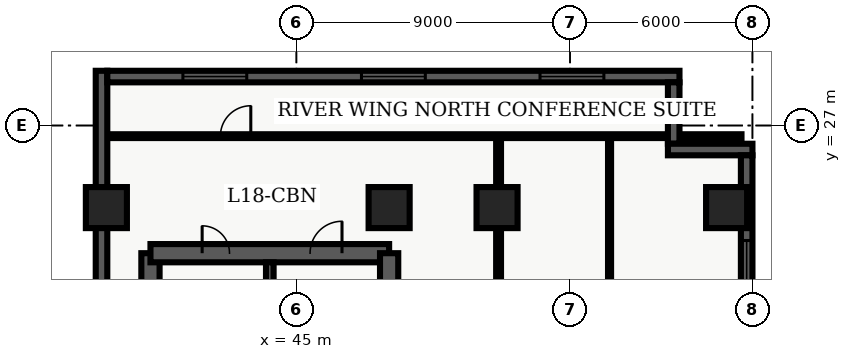
"""IFC4 building model, lengths in metres.
Left out: names, types, materials, properties, quantities, classifications, styles, units other than length and angle.
Written with IfcOpenShell. Run it as: python <this file> out.ifc"""

import sys

from ifc_helpers import new_model, entity, si_unit, converted_unit, direction, frame, origin_with_axes, origin_2d_with_axis, place, context, subcontext, project, spatial, polyline, rectangle, outline, extrude, element, fill, save


model = new_model("IFC4")
c1 = context("Model", 3, precision=1e-05, world=origin_with_axes(), true_north=direction((0.0, 1.0)))
c2 = subcontext(c1, "Body", "Model", "MODEL_VIEW")
j1 = project(units=[si_unit("LENGTHUNIT", "METRE"), converted_unit("PLANEANGLEUNIT", "DEGREE", entity("IfcPlaneAngleMeasure", 0.017), si_unit("PLANEANGLEUNIT", "RADIAN"), dimensions=[0, 0, 0, 0, 0, 0, 0])], contexts=[c1])
p1 = place(None, origin_with_axes())
s1 = spatial("IfcSite", under=j1, at=p1, CompositionType="ELEMENT")
p2 = place(p1, origin_with_axes())
s2 = spatial("IfcBuilding", under=s1, at=p2, CompositionType="ELEMENT")
p3 = place(p2, frame((0.0, 0.0, 75.6), z_axis=(0.0, 0.0, 1.0), x_axis=(1.0, 0.0, 0.0)))
s3 = spatial("IfcBuildingStorey", under=s2, at=p3, CompositionType="ELEMENT", Elevation=75.6)
p4 = place(p3, frame((40.2, 7.2, 0.0), z_axis=(0.0, 0.0, 1.0), x_axis=(0.0, 1.0, 0.0)))
e1 = element("IfcWall", 1, at=p4, inside=s3, PredefinedType="SHEAR", context=c2, shape_type="SweptSolid", body=[
    extrude(outline(polyline([(0.0, -0.3), (15.6, -0.3), (15.6, 0.3), (0.0, 0.3), (0.0, -0.3)])), origin_with_axes(), (0.0, 0.0, 1.0), 3.6),
])
p5 = place(p4, frame((12.75, 0.0, 0.0), z_axis=(0.0, 0.0, 1.0), x_axis=(1.0, 0.0, 0.0)))
e2 = element("IfcOpeningElement", 2, at=p5, cuts=e1, PredefinedType="OPENING", context=c2, shape_type="SweptSolid", body=[
    extrude(rectangle(XDim=1.2, YDim=0.62, at=origin_2d_with_axis()), origin_with_axes(), (0.0, 0.0, 1.0), 2.15),
])
p6 = place(p4, frame((9.3, 0.0, 0.0), z_axis=(0.0, 0.0, 1.0), x_axis=(1.0, 0.0, 0.0)))
e3 = element("IfcOpeningElement", 3, at=p6, cuts=e1, PredefinedType="OPENING", context=c2, shape_type="SweptSolid", body=[
    extrude(rectangle(XDim=0.9, YDim=0.62, at=origin_2d_with_axis()), origin_with_axes(), (0.0, 0.0, 1.0), 2.15),
])
p7 = place(p3, frame((40.2, 22.8, 0.0), z_axis=(0.0, 0.0, 1.0), x_axis=(1.0, 0.0, 0.0)))
e4 = element("IfcWall", 4, at=p7, inside=s3, PredefinedType="SHEAR", context=c2, shape_type="SweptSolid", body=[
    extrude(outline(polyline([(0.0, -0.3), (7.85, -0.3), (7.85, 0.3), (0.0, 0.3), (0.0, -0.3)])), origin_with_axes(), (0.0, 0.0, 1.0), 3.6),
])
p8 = place(p7, frame((5.775, 0.0, 0.0), z_axis=(0.0, 0.0, 1.0), x_axis=(1.0, 0.0, 0.0)))
e5 = element("IfcOpeningElement", 5, at=p8, cuts=e4, PredefinedType="OPENING", context=c2, shape_type="SweptSolid", body=[
    extrude(rectangle(XDim=1.05, YDim=0.62, at=origin_2d_with_axis()), origin_with_axes(), (0.0, 0.0, 1.0), 2.15),
])
p9 = place(p7, frame((2.15, 0.0, 0.0), z_axis=(0.0, 0.0, 1.0), x_axis=(1.0, 0.0, 0.0)))
e6 = element("IfcOpeningElement", 6, at=p9, cuts=e4, PredefinedType="OPENING", context=c2, shape_type="SweptSolid", body=[
    extrude(rectangle(XDim=0.9, YDim=0.62, at=origin_2d_with_axis()), origin_with_axes(), (0.0, 0.0, 1.0), 2.15),
])
p10 = place(p3, frame((48.05, 7.2, 0.0), z_axis=(0.0, 0.0, 1.0), x_axis=(0.0, 1.0, 0.0)))
e7 = element("IfcWall", 7, at=p10, inside=s3, PredefinedType="SHEAR", context=c2, shape_type="SweptSolid", body=[
    extrude(outline(polyline([(0.0, -0.3), (15.6, -0.3), (15.6, 0.3), (0.0, 0.3), (0.0, -0.3)])), origin_with_axes(), (0.0, 0.0, 1.0), 3.6),
])
p11 = place(p10, frame((1.425, 0.0, 0.0), z_axis=(0.0, 0.0, 1.0), x_axis=(1.0, 0.0, 0.0)))
e8 = element("IfcOpeningElement", 8, at=p11, cuts=e7, PredefinedType="OPENING", context=c2, shape_type="SweptSolid", body=[
    extrude(rectangle(XDim=1.05, YDim=0.62, at=origin_2d_with_axis()), origin_with_axes(), (0.0, 0.0, 1.0), 2.15),
])
p12 = place(p10, frame((3.475, 0.0, 0.0), z_axis=(0.0, 0.0, 1.0), x_axis=(1.0, 0.0, 0.0)))
e9 = element("IfcOpeningElement", 9, at=p12, cuts=e7, PredefinedType="OPENING", context=c2, shape_type="SweptSolid", body=[
    extrude(rectangle(XDim=1.05, YDim=0.62, at=origin_2d_with_axis()), origin_with_axes(), (0.0, 0.0, 1.0), 2.15),
])
p13 = place(p10, frame((5.625, 0.0, 0.0), z_axis=(0.0, 0.0, 1.0), x_axis=(1.0, 0.0, 0.0)))
e10 = element("IfcOpeningElement", 10, at=p13, cuts=e7, PredefinedType="OPENING", context=c2, shape_type="SweptSolid", body=[
    extrude(rectangle(XDim=0.95, YDim=0.62, at=origin_2d_with_axis()), origin_with_axes(), (0.0, 0.0, 1.0), 2.15),
])
p14 = place(p3, frame((44.125, 7.5, 0.0), z_axis=(0.0, 0.0, 1.0), x_axis=(0.0, 1.0, 0.0)))
e11 = element("IfcWall", 11, at=p14, inside=s3, PredefinedType="SHEAR", context=c2, shape_type="SweptSolid", body=[
    extrude(outline(polyline([(0.0, -0.125), (15.0, -0.125), (15.0, 0.125), (0.0, 0.125), (0.0, -0.125)])), origin_with_axes(), (0.0, 0.0, 1.0), 3.6),
])
for number, where, z_axis, x_axis in (
    (12, (38.75, 24.3, 0.0), (0.0, 0.0, 1.0), (1.0, 0.0, 0.0)),
    (13, (48.05, 24.3, 0.0), (0.0, 0.0, 1.0), (1.0, 0.0, 0.0)),
    (14, (51.6, 24.3, 0.0), (0.0, 0.0, 1.0), (1.0, 0.0, 0.0)),
    (15, (59.15, 24.3, 0.0), (0.0, 0.0, 1.0), (1.0, 0.0, 0.0)),
):
    element("IfcColumn", number, at=place(p3, frame(where, z_axis=z_axis, x_axis=x_axis)), inside=s3, PredefinedType="COLUMN", context=c2, shape_type="SweptSolid", body=[
        extrude(rectangle(XDim=1.35, YDim=1.35, at=origin_2d_with_axis()), origin_with_axes(), (0.0, 0.0, 1.0), 3.9),
    ])
p15 = place(p3, frame((51.65, 7.85, 0.0), z_axis=(0.0, 0.0, 1.0), x_axis=(0.0, 1.0, 0.0)))
e16 = element("IfcWall", 16, at=p15, inside=s3, PredefinedType="PARTITIONING", context=c2, shape_type="SweptSolid", body=[
    extrude(outline(polyline([(0.0, -0.08), (18.8, -0.08), (18.8, 0.08), (0.0, 0.08), (0.0, -0.08)])), origin_with_axes(), (0.0, 0.0, 1.0), 2.64),
])
p16 = place(p15, frame((4.443, 0.0, 0.0), z_axis=(0.0, 0.0, 1.0), x_axis=(1.0, 0.0, 0.0)))
e17 = element("IfcOpeningElement", 17, at=p16, cuts=e16, PredefinedType="OPENING", context=c2, shape_type="SweptSolid", body=[
    extrude(rectangle(XDim=1.0, YDim=0.18, at=origin_2d_with_axis()), origin_with_axes(), (0.0, 0.0, 1.0), 2.15),
])
p17 = place(p15, frame((13.503, 0.0, 0.0), z_axis=(0.0, 0.0, 1.0), x_axis=(1.0, 0.0, 0.0)))
e18 = element("IfcOpeningElement", 18, at=p17, cuts=e16, PredefinedType="OPENING", context=c2, shape_type="SweptSolid", body=[
    extrude(rectangle(XDim=1.0, YDim=0.18, at=origin_2d_with_axis()), origin_with_axes(), (0.0, 0.0, 1.0), 2.15),
])
p18 = place(p3, frame((38.76, 26.65, 0.0), z_axis=(0.0, 0.0, 1.0), x_axis=(1.0, 0.0, 0.0)))
e19 = element("IfcWall", 19, at=p18, inside=s3, PredefinedType="PARTITIONING", context=c2, shape_type="SweptSolid", body=[
    extrude(outline(polyline([(0.0, -0.062), (20.88, -0.062), (20.88, 0.062), (0.0, 0.062), (0.0, -0.062)])), origin_with_axes(), (0.0, 0.0, 1.0), 2.64),
])
p19 = place(p18, frame((4.24, 0.0, 0.0), z_axis=(0.0, 0.0, 1.0), x_axis=(1.0, 0.0, 0.0)))
e20 = element("IfcOpeningElement", 20, at=p19, cuts=e19, PredefinedType="OPENING", context=c2, shape_type="SweptSolid", body=[
    extrude(rectangle(XDim=1.0, YDim=0.145, at=origin_2d_with_axis()), origin_with_axes(), (0.0, 0.0, 1.0), 2.15),
])
p20 = place(p3, frame((55.3, 7.98, 0.0), z_axis=(0.0, 0.0, 1.0), x_axis=(0.0, 1.0, 0.0)))
e21 = element("IfcWall", 21, at=p20, inside=s3, PredefinedType="PARTITIONING", context=c2, shape_type="SweptSolid", body=[
    extrude(outline(polyline([(0.0, -0.05), (18.54, -0.05), (18.54, 0.05), (0.0, 0.05), (0.0, -0.05)])), origin_with_axes(), (0.0, 0.0, 1.0), 2.64),
])
p21 = place(p20, frame((4.033, 0.0, 0.0), z_axis=(0.0, 0.0, 1.0), x_axis=(1.0, 0.0, 0.0)))
e22 = element("IfcOpeningElement", 22, at=p21, cuts=e21, PredefinedType="OPENING", context=c2, shape_type="SweptSolid", body=[
    extrude(rectangle(XDim=0.95, YDim=0.12, at=origin_2d_with_axis()), origin_with_axes(), (0.0, 0.0, 1.0), 2.15),
])
p22 = place(p20, frame((13.373, 0.0, 0.0), z_axis=(0.0, 0.0, 1.0), x_axis=(1.0, 0.0, 0.0)))
e23 = element("IfcOpeningElement", 23, at=p22, cuts=e21, PredefinedType="OPENING", context=c2, shape_type="SweptSolid", body=[
    extrude(rectangle(XDim=0.95, YDim=0.12, at=origin_2d_with_axis()), origin_with_axes(), (0.0, 0.0, 1.0), 2.15),
])
p23 = place(p3, frame((38.59, 21.22, 0.0), z_axis=(0.0, 0.0, 1.0), x_axis=(0.0, 1.0, 0.0)))
e24 = element("IfcWall", 24, at=p23, inside=s3, PredefinedType="SOLIDWALL", context=c2, shape_type="SweptSolid", body=[
    extrude(outline(polyline([(0.0, -0.19), (7.58, -0.19), (7.58, 0.19), (0.0, 0.19), (0.0, -0.19)])), origin_with_axes(), (0.0, 0.0, 1.0), 3.6),
])
p24 = place(p3, frame((38.78, 28.61, 0.0), z_axis=(0.0, 0.0, 1.0), x_axis=(1.0, 0.0, 0.0)))
e25 = element("IfcWall", 25, at=p24, inside=s3, PredefinedType="SOLIDWALL", context=c2, shape_type="SweptSolid", body=[
    extrude(outline(polyline([(0.0, -0.19), (18.82, -0.19), (18.82, 0.19), (0.0, 0.19), (0.0, -0.19)])), origin_with_axes(), (0.0, 0.0, 1.0), 3.6),
])
p25 = place(p24, frame((3.537, 0.0, 0.45), z_axis=(0.0, 0.0, 1.0), x_axis=(1.0, 0.0, 0.0)))
e26 = element("IfcOpeningElement", 26, at=p25, cuts=e25, PredefinedType="OPENING", context=c2, shape_type="SweptSolid", body=[
    extrude(rectangle(XDim=2.1, YDim=0.4, at=origin_2d_with_axis()), origin_with_axes(), (0.0, 0.0, 1.0), 2.2),
])
p26 = place(p24, frame((9.41, 0.0, 0.45), z_axis=(0.0, 0.0, 1.0), x_axis=(1.0, 0.0, 0.0)))
e27 = element("IfcOpeningElement", 27, at=p26, cuts=e25, PredefinedType="OPENING", context=c2, shape_type="SweptSolid", body=[
    extrude(rectangle(XDim=2.1, YDim=0.4, at=origin_2d_with_axis()), origin_with_axes(), (0.0, 0.0, 1.0), 2.2),
])
p27 = place(p24, frame((15.283, 0.0, 0.45), z_axis=(0.0, 0.0, 1.0), x_axis=(1.0, 0.0, 0.0)))
e28 = element("IfcOpeningElement", 28, at=p27, cuts=e25, PredefinedType="OPENING", context=c2, shape_type="SweptSolid", body=[
    extrude(rectangle(XDim=2.1, YDim=0.4, at=origin_2d_with_axis()), origin_with_axes(), (0.0, 0.0, 1.0), 2.2),
])
p28 = place(p3, frame((57.41, 28.42, 0.0), z_axis=(0.0, 0.0, 1.0), x_axis=(0.0, -1.0, 0.0)))
e29 = element("IfcWall", 29, at=p28, inside=s3, PredefinedType="SOLIDWALL", context=c2, shape_type="SweptSolid", body=[
    extrude(outline(polyline([(0.0, -0.19), (2.02, -0.19), (2.02, 0.19), (0.0, 0.19), (0.0, -0.19)])), origin_with_axes(), (0.0, 0.0, 1.0), 3.6),
])
p29 = place(p3, frame((57.22, 26.21, 0.0), z_axis=(0.0, 0.0, 1.0), x_axis=(1.0, 0.0, 0.0)))
e30 = element("IfcWall", 30, at=p29, inside=s3, PredefinedType="SOLIDWALL", context=c2, shape_type="SweptSolid", body=[
    extrude(outline(polyline([(0.0, -0.19), (2.78, -0.19), (2.78, 0.19), (0.0, 0.19), (0.0, -0.19)])), origin_with_axes(), (0.0, 0.0, 1.0), 3.6),
])
p30 = place(p3, frame((59.81, 26.02, 0.0), z_axis=(0.0, 0.0, 1.0), x_axis=(0.0, -1.0, 0.0)))
e31 = element("IfcWall", 31, at=p30, inside=s3, PredefinedType="SOLIDWALL", context=c2, shape_type="SweptSolid", body=[
    extrude(outline(polyline([(0.0, -0.19), (23.62, -0.19), (23.62, 0.19), (0.0, 0.19), (0.0, -0.19)])), origin_with_axes(), (0.0, 0.0, 1.0), 3.6),
])
p31 = place(p30, frame((3.853, 0.0, 0.45), z_axis=(0.0, 0.0, 1.0), x_axis=(1.0, 0.0, 0.0)))
e32 = element("IfcOpeningElement", 32, at=p31, cuts=e31, PredefinedType="OPENING", context=c2, shape_type="SweptSolid", body=[
    extrude(rectangle(XDim=2.1, YDim=0.4, at=origin_2d_with_axis()), origin_with_axes(), (0.0, 0.0, 1.0), 2.2),
])
p32 = place(p30, frame((20.218, 0.0, 0.45), z_axis=(0.0, 0.0, 1.0), x_axis=(1.0, 0.0, 0.0)))
e33 = element("IfcOpeningElement", 33, at=p32, cuts=e31, PredefinedType="OPENING", context=c2, shape_type="SweptSolid", body=[
    extrude(rectangle(XDim=2.1, YDim=0.4, at=origin_2d_with_axis()), origin_with_axes(), (0.0, 0.0, 1.0), 2.2),
])
p33 = place(p7, frame((5.775, 0.0, 0.0), z_axis=(0.0, 0.0, 1.0), x_axis=(1.0, 0.0, 0.0)))
e34 = element("IfcDoor", 34, at=p33, inside=s3, OperationType="SINGLE_SWING_RIGHT", PredefinedType="DOOR", context=c2, shape_type="SweptSolid", body=[
    extrude(rectangle(XDim=1.05, YDim=0.09, at=origin_2d_with_axis()), origin_with_axes(), (0.0, 0.0, 1.0), 2.15),
])
fill(e5, e34)
p34 = place(p7, frame((2.15, 0.0, 0.0), z_axis=(0.0, 0.0, 1.0), x_axis=(1.0, 0.0, 0.0)))
e35 = element("IfcDoor", 35, at=p34, inside=s3, OperationType="SINGLE_SWING_LEFT", PredefinedType="DOOR", context=c2, shape_type="SweptSolid", body=[
    extrude(rectangle(XDim=0.9, YDim=0.09, at=origin_2d_with_axis()), origin_with_axes(), (0.0, 0.0, 1.0), 2.15),
])
fill(e6, e35)
p35 = place(p18, frame((4.24, 0.0, 0.0), z_axis=(0.0, 0.0, 1.0), x_axis=(1.0, 0.0, 0.0)))
e36 = element("IfcDoor", 36, at=p35, inside=s3, OperationType="SINGLE_SWING_RIGHT", PredefinedType="DOOR", context=c2, shape_type="SweptSolid", body=[
    extrude(rectangle(XDim=1.0, YDim=0.075, at=origin_2d_with_axis()), origin_with_axes(), (0.0, 0.0, 1.0), 2.15),
])
fill(e20, e36)
p36 = place(p24, frame((3.537, 0.0, 0.45), z_axis=(0.0, 0.0, 1.0), x_axis=(1.0, 0.0, 0.0)))
e37 = element("IfcWindow", 37, at=p36, inside=s3, PredefinedType="WINDOW", context=c2, shape_type="SweptSolid", body=[
    extrude(rectangle(XDim=2.1, YDim=0.09, at=origin_2d_with_axis()), origin_with_axes(), (0.0, 0.0, 1.0), 2.2),
])
fill(e26, e37)
p37 = place(p24, frame((9.41, 0.0, 0.45), z_axis=(0.0, 0.0, 1.0), x_axis=(1.0, 0.0, 0.0)))
e38 = element("IfcWindow", 38, at=p37, inside=s3, PredefinedType="WINDOW", context=c2, shape_type="SweptSolid", body=[
    extrude(rectangle(XDim=2.1, YDim=0.09, at=origin_2d_with_axis()), origin_with_axes(), (0.0, 0.0, 1.0), 2.2),
])
fill(e27, e38)
p38 = place(p24, frame((15.283, 0.0, 0.45), z_axis=(0.0, 0.0, 1.0), x_axis=(1.0, 0.0, 0.0)))
e39 = element("IfcWindow", 39, at=p38, inside=s3, PredefinedType="WINDOW", context=c2, shape_type="SweptSolid", body=[
    extrude(rectangle(XDim=2.1, YDim=0.09, at=origin_2d_with_axis()), origin_with_axes(), (0.0, 0.0, 1.0), 2.2),
])
fill(e28, e39)
p39 = place(p30, frame((3.853, 0.0, 0.45), z_axis=(0.0, 0.0, 1.0), x_axis=(1.0, 0.0, 0.0)))
e40 = element("IfcWindow", 40, at=p39, inside=s3, PredefinedType="WINDOW", context=c2, shape_type="SweptSolid", body=[
    extrude(rectangle(XDim=2.1, YDim=0.09, at=origin_2d_with_axis()), origin_with_axes(), (0.0, 0.0, 1.0), 2.2),
])
fill(e32, e40)
save(model, sys.argv[1])
